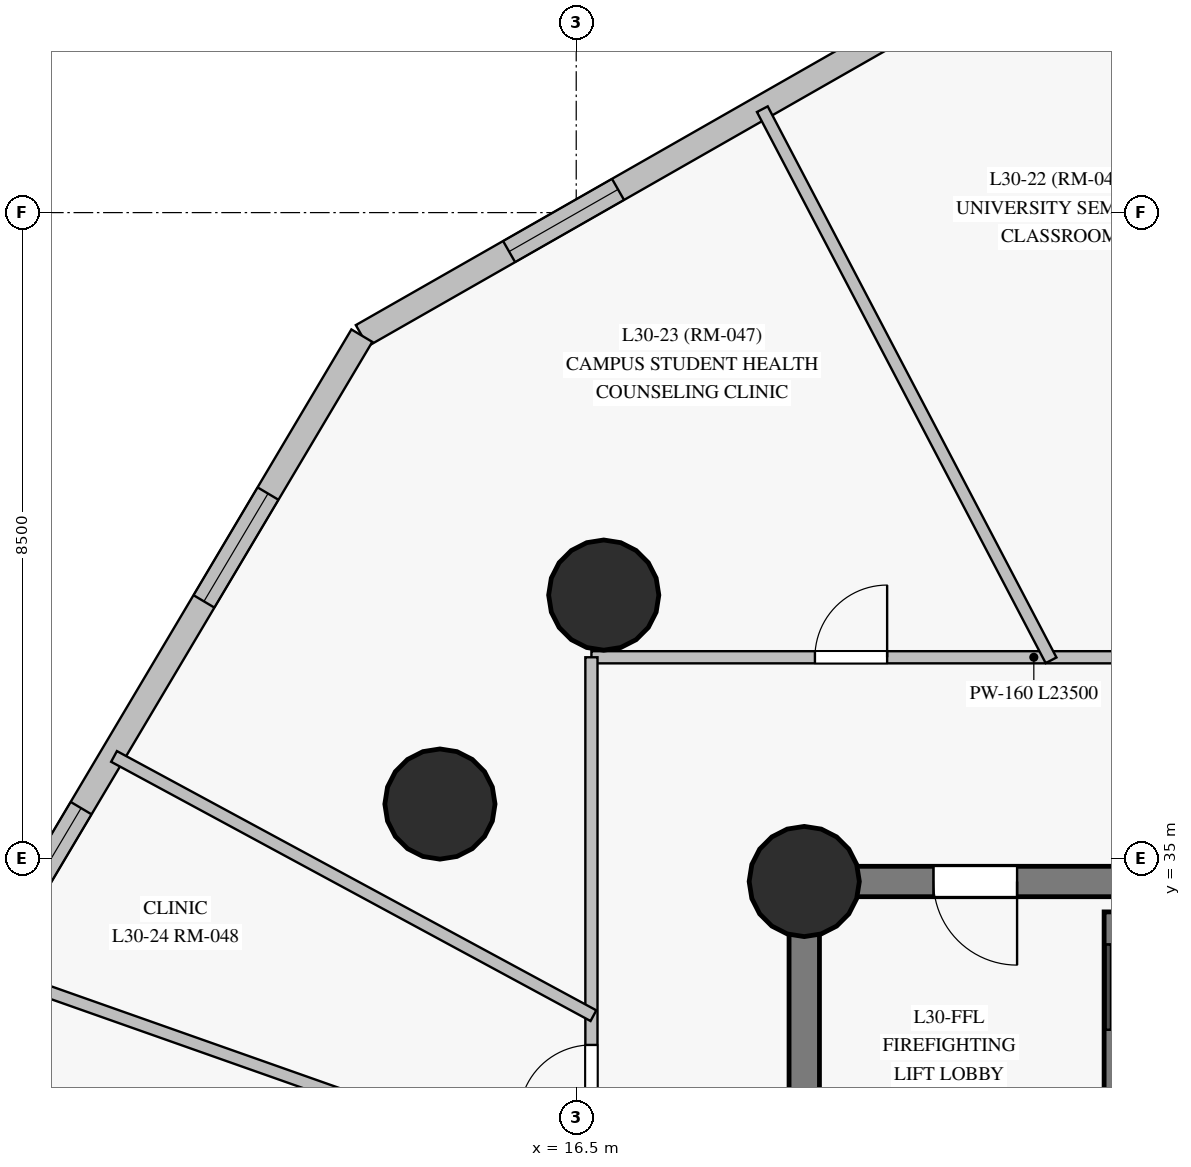
"""IFC4 building model, lengths in metres.
Left out: names, types, materials, properties, quantities, classifications, styles, units other than length and angle.
Written with IfcOpenShell. Run it as: python <this file> out.ifc"""

import sys

from ifc_helpers import new_model, si_unit, direction, frame, frame_2d, origin, origin_with_axes, origin_2d, place, context, subcontext, project, spatial, rectangle, circle, extrude, source, transform, mapped, element, fill, save


model = new_model("IFC4")
c1 = context("Model", 3, precision=1e-05, world=origin(), true_north=direction((0.0, 1.0)))
c2 = subcontext(c1, "Body", "Model", "MODEL_VIEW")
j1 = project(units=[si_unit("LENGTHUNIT", "METRE"), si_unit("PLANEANGLEUNIT", "RADIAN")], contexts=[c1])
p1 = place(None, origin())
s1 = spatial("IfcSite", under=j1, at=p1, CompositionType="ELEMENT")
p2 = place(p1, origin())
s2 = spatial("IfcBuilding", under=s1, at=p2, CompositionType="ELEMENT")
p3 = place(p2, frame((0.0, 0.0, 111.45)))
s3 = spatial("IfcBuildingStorey", under=s2, at=p3, CompositionType="ELEMENT", Elevation=111.45)
p4 = place(p3, frame((26.55, 34.7, 0.0), z_axis=(0.0, 0.0, 1.0), x_axis=(-1.0, 0.0, 0.0)))
e1 = element("IfcWall", 1, at=p4, inside=s3, PredefinedType="SHEAR", context=c2, shape_type="SweptSolid", body=[
    extrude(rectangle(XDim=7.05, YDim=0.4, at=frame_2d((3.525, 0.0))), origin(), (0.0, 0.0, 1.0), 2.825),
])
p5 = place(p4, frame((4.25, 0.0, 0.0)))
e2 = element("IfcOpeningElement", 2, at=p5, cuts=e1, PredefinedType="OPENING", context=c2, shape_type="SweptSolid", body=[
    extrude(rectangle(XDim=1.1, YDim=2.15, at=frame_2d((0.55, 1.075))), frame((0.0, 0.21, 0.0), z_axis=(0.0, -1.0, 0.0), x_axis=(1.0, 0.0, 0.0)), (0.0, 0.0, 1.0), 0.42),
])
p6 = place(p3, frame((19.5, 34.7, 0.0), z_axis=(0.0, 0.0, 1.0), x_axis=(0.0, -1.0, 0.0)))
e3 = element("IfcWall", 3, at=p6, inside=s3, PredefinedType="SHEAR", context=c2, shape_type="SweptSolid", body=[
    extrude(rectangle(XDim=16.4, YDim=0.4, at=frame_2d((8.2, 0.0))), origin(), (0.0, 0.0, 1.0), 2.825),
])
p7 = place(p6, frame((3.1, 0.0, 0.0)))
e4 = element("IfcOpeningElement", 4, at=p7, cuts=e3, PredefinedType="OPENING", context=c2, shape_type="SweptSolid", body=[
    extrude(rectangle(XDim=1.1, YDim=2.15, at=frame_2d((0.55, 1.075))), frame((0.0, 0.21, 0.0), z_axis=(0.0, -1.0, 0.0), x_axis=(1.0, 0.0, 0.0)), (0.0, 0.0, 1.0), 0.42),
])
m1 = source(origin_with_axes(), c2, "Body", "SweptSolid", [
    extrude(circle(Radius=0.725, at=origin_2d()), origin(), (0.0, 0.0, 1.0), 3.05),
])
for number, where, z_axis, x_axis in (
    (5, (19.5, 34.7, 0.0), (0.0, 0.0, 1.0), (1.0, 0.0, 0.0)),
    (6, (16.862, 38.468, 0.0), (0.0, 0.0, 1.0), (1.0, 0.0, 0.0)),
    (7, (14.707, 35.719, 0.0), (0.0, 0.0, 1.0), (1.0, 0.0, 0.0)),
):
    element("IfcColumn", number, at=place(p3, frame(where, z_axis=z_axis, x_axis=x_axis)), inside=s3, PredefinedType="COLUMN", context=c2, shape_type="MappedRepresentation", body=[
        mapped(m1, transform((0.0, 0.0, 0.0), scale=1.0)),
    ])
p8 = place(p3, frame((25.925, 48.873, 0.0), z_axis=(0.0, 0.0, 1.0), x_axis=(-0.868415696325, -0.495836846529, 0.0)))
e8 = element("IfcWall", 8, at=p8, inside=s3, PredefinedType="SOLIDWALL", context=c2, shape_type="SweptSolid", body=[
    extrude(rectangle(XDim=14.101, YDim=0.32, at=frame_2d((7.05, 0.0))), origin(), (0.0, 0.0, 1.0), 2.825),
])
p9 = place(p8, frame((3.686, 0.0, 0.85)))
e9 = element("IfcOpeningElement", 9, at=p9, cuts=e8, PredefinedType="OPENING", context=c2, shape_type="SweptSolid", body=[
    extrude(rectangle(XDim=1.65, YDim=1.65, at=frame_2d((0.825, 0.825))), frame((0.0, 0.17, 0.0), z_axis=(0.0, -1.0, 0.0), x_axis=(1.0, 0.0, 0.0)), (0.0, 0.0, 1.0), 0.34),
])
p10 = place(p8, frame((10.22, 0.0, 0.85)))
e10 = element("IfcOpeningElement", 10, at=p10, cuts=e8, PredefinedType="OPENING", context=c2, shape_type="SweptSolid", body=[
    extrude(rectangle(XDim=1.65, YDim=1.65, at=frame_2d((0.825, 0.825))), frame((0.0, 0.17, 0.0), z_axis=(0.0, -1.0, 0.0), x_axis=(1.0, 0.0, 0.0)), (0.0, 0.0, 1.0), 0.34),
])
p11 = place(p3, frame((13.68, 41.881, 0.0), z_axis=(0.0, 0.0, 1.0), x_axis=(-0.510835150925, -0.859678689151, 0.0)))
e11 = element("IfcWall", 11, at=p11, inside=s3, PredefinedType="SOLIDWALL", context=c2, shape_type="SweptSolid", body=[
    extrude(rectangle(XDim=11.303, YDim=0.32, at=frame_2d((5.652, 0.0))), origin(), (0.0, 0.0, 1.0), 2.825),
])
p12 = place(p11, frame((2.417, 0.0, 0.85)))
e12 = element("IfcOpeningElement", 12, at=p12, cuts=e11, PredefinedType="OPENING", context=c2, shape_type="SweptSolid", body=[
    extrude(rectangle(XDim=1.65, YDim=1.65, at=frame_2d((0.825, 0.825))), frame((0.0, 0.17, 0.0), z_axis=(0.0, -1.0, 0.0), x_axis=(1.0, 0.0, 0.0)), (0.0, 0.0, 1.0), 0.34),
])
p13 = place(p11, frame((7.23, 0.0, 0.85)))
e13 = element("IfcOpeningElement", 13, at=p13, cuts=e11, PredefinedType="OPENING", context=c2, shape_type="SweptSolid", body=[
    extrude(rectangle(XDim=1.65, YDim=1.65, at=frame_2d((0.825, 0.825))), frame((0.0, 0.17, 0.0), z_axis=(0.0, -1.0, 0.0), x_axis=(1.0, 0.0, 0.0)), (0.0, 0.0, 1.0), 0.34),
])
p14 = place(p3, frame((23.545, 18.7, 0.0), z_axis=(0.0, 0.0, 1.0), x_axis=(0.0, 1.0, 0.0)))
e14 = element("IfcWall", 14, at=p14, inside=s3, PredefinedType="SHEAR", context=c2, shape_type="SweptSolid", body=[
    extrude(rectangle(XDim=15.6, YDim=0.2, at=frame_2d((7.8, 0.0))), origin(), (0.0, 0.0, 1.0), 2.825),
])
p15 = place(p14, frame((2.75, 0.0, 0.0)))
e15 = element("IfcOpeningElement", 15, at=p15, cuts=e14, PredefinedType="OPENING", context=c2, shape_type="SweptSolid", body=[
    extrude(rectangle(XDim=1.15, YDim=2.15, at=frame_2d((0.575, 1.075))), frame((0.0, 0.11, 0.0), z_axis=(0.0, -1.0, 0.0), x_axis=(1.0, 0.0, 0.0)), (0.0, 0.0, 1.0), 0.22),
])
p16 = place(p14, frame((0.14, 0.0, 0.0)))
e16 = element("IfcOpeningElement", 16, at=p16, cuts=e14, PredefinedType="OPENING", context=c2, shape_type="SweptSolid", body=[
    extrude(rectangle(XDim=0.88, YDim=2.1, at=frame_2d((0.44, 1.05))), frame((0.0, 0.11, 0.0), z_axis=(0.0, -1.0, 0.0), x_axis=(1.0, 0.0, 0.0)), (0.0, 0.0, 1.0), 0.22),
])
p17 = place(p14, frame((1.36, 0.0, 0.0)))
e17 = element("IfcOpeningElement", 17, at=p17, cuts=e14, PredefinedType="OPENING", context=c2, shape_type="SweptSolid", body=[
    extrude(rectangle(XDim=0.88, YDim=2.1, at=frame_2d((0.44, 1.05))), frame((0.0, 0.11, 0.0), z_axis=(0.0, -1.0, 0.0), x_axis=(1.0, 0.0, 0.0)), (0.0, 0.0, 1.0), 0.22),
])
p18 = place(p14, frame((12.1, 0.0, 0.0)))
e18 = element("IfcOpeningElement", 18, at=p18, cuts=e14, PredefinedType="OPENING", context=c2, shape_type="SweptSolid", body=[
    extrude(rectangle(XDim=1.12, YDim=2.15, at=frame_2d((0.56, 1.075))), frame((0.0, 0.11, 0.0), z_axis=(0.0, -1.0, 0.0), x_axis=(1.0, 0.0, 0.0)), (0.0, 0.0, 1.0), 0.22),
])
p19 = place(p14, frame((14.05, 0.0, 0.0)))
e19 = element("IfcOpeningElement", 19, at=p19, cuts=e14, PredefinedType="OPENING", context=c2, shape_type="SweptSolid", body=[
    extrude(rectangle(XDim=1.12, YDim=2.15, at=frame_2d((0.56, 1.075))), frame((0.0, 0.11, 0.0), z_axis=(0.0, -1.0, 0.0), x_axis=(1.0, 0.0, 0.0)), (0.0, 0.0, 1.0), 0.22),
])
p20 = place(p3, frame((16.7, 37.65, 0.0), z_axis=(0.0, 0.0, 1.0), x_axis=(1.0, 0.0, 0.0)))
e20 = element("IfcWall", 20, at=p20, inside=s3, PredefinedType="PARTITIONING", context=c2, shape_type="SweptSolid", body=[
    extrude(rectangle(XDim=23.5, YDim=0.16, at=frame_2d((11.75, 0.0))), origin(), (0.0, 0.0, 1.0), 2.325),
])
p21 = place(p20, frame((20.456, 0.0, 0.0)))
e21 = element("IfcOpeningElement", 21, at=p21, cuts=e20, PredefinedType="OPENING", context=c2, shape_type="SweptSolid", body=[
    extrude(rectangle(XDim=0.96, YDim=2.15, at=frame_2d((0.48, 1.075))), frame((0.0, 0.09, 0.0), z_axis=(0.0, -1.0, 0.0), x_axis=(1.0, 0.0, 0.0)), (0.0, 0.0, 1.0), 0.18),
])
p22 = place(p20, frame((19.359, 0.0, 0.0)))
e22 = element("IfcOpeningElement", 22, at=p22, cuts=e20, PredefinedType="OPENING", context=c2, shape_type="SweptSolid", body=[
    extrude(rectangle(XDim=0.95, YDim=2.15, at=frame_2d((0.475, 1.075))), frame((0.0, 0.09, 0.0), z_axis=(0.0, -1.0, 0.0), x_axis=(1.0, 0.0, 0.0)), (0.0, 0.0, 1.0), 0.18),
])
p23 = place(p20, frame((15.91, 0.0, 0.0)))
e23 = element("IfcOpeningElement", 23, at=p23, cuts=e20, PredefinedType="OPENING", context=c2, shape_type="SweptSolid", body=[
    extrude(rectangle(XDim=0.95, YDim=2.15, at=frame_2d((0.475, 1.075))), frame((0.0, 0.09, 0.0), z_axis=(0.0, -1.0, 0.0), x_axis=(1.0, 0.0, 0.0)), (0.0, 0.0, 1.0), 0.18),
])
p24 = place(p20, frame((14.8, 0.0, 0.0)))
e24 = element("IfcOpeningElement", 24, at=p24, cuts=e20, PredefinedType="OPENING", context=c2, shape_type="SweptSolid", body=[
    extrude(rectangle(XDim=0.96, YDim=2.15, at=frame_2d((0.48, 1.075))), frame((0.0, 0.09, 0.0), z_axis=(0.0, -1.0, 0.0), x_axis=(1.0, 0.0, 0.0)), (0.0, 0.0, 1.0), 0.18),
])
p25 = place(p20, frame((11.365, 0.0, 0.0)))
e25 = element("IfcOpeningElement", 25, at=p25, cuts=e20, PredefinedType="OPENING", context=c2, shape_type="SweptSolid", body=[
    extrude(rectangle(XDim=0.95, YDim=2.15, at=frame_2d((0.475, 1.075))), frame((0.0, 0.09, 0.0), z_axis=(0.0, -1.0, 0.0), x_axis=(1.0, 0.0, 0.0)), (0.0, 0.0, 1.0), 0.18),
])
p26 = place(p20, frame((7.75, 0.0, 0.0)))
e26 = element("IfcOpeningElement", 26, at=p26, cuts=e20, PredefinedType="OPENING", context=c2, shape_type="SweptSolid", body=[
    extrude(rectangle(XDim=0.96, YDim=2.15, at=frame_2d((0.48, 1.075))), frame((0.0, 0.09, 0.0), z_axis=(0.0, -1.0, 0.0), x_axis=(1.0, 0.0, 0.0)), (0.0, 0.0, 1.0), 0.18),
])
p27 = place(p20, frame((2.94, 0.0, 0.0)))
e27 = element("IfcOpeningElement", 27, at=p27, cuts=e20, PredefinedType="OPENING", context=c2, shape_type="SweptSolid", body=[
    extrude(rectangle(XDim=0.95, YDim=2.15, at=frame_2d((0.475, 1.075))), frame((0.0, 0.09, 0.0), z_axis=(0.0, -1.0, 0.0), x_axis=(1.0, 0.0, 0.0)), (0.0, 0.0, 1.0), 0.18),
])
p28 = place(p20, frame((17.561, 0.0, 0.0)))
e28 = element("IfcOpeningElement", 28, at=p28, cuts=e20, PredefinedType="OPENING", context=c2, shape_type="SweptSolid", body=[
    extrude(rectangle(XDim=0.86, YDim=2.04, at=frame_2d((0.43, 1.02))), frame((0.0, 0.09, 0.0), z_axis=(0.0, -1.0, 0.0), x_axis=(1.0, 0.0, 0.0)), (0.0, 0.0, 1.0), 0.18),
])
p29 = place(p3, frame((16.7, 15.35, 0.0), z_axis=(0.0, 0.0, 1.0), x_axis=(0.0, 1.0, 0.0)))
e29 = element("IfcWall", 29, at=p29, inside=s3, PredefinedType="PARTITIONING", context=c2, shape_type="SweptSolid", body=[
    extrude(rectangle(XDim=22.3, YDim=0.16, at=frame_2d((11.15, 0.0))), origin(), (0.0, 0.0, 1.0), 2.225),
])
p30 = place(p29, frame((10.635, 0.0, 0.0)))
e30 = element("IfcOpeningElement", 30, at=p30, cuts=e29, PredefinedType="OPENING", context=c2, shape_type="SweptSolid", body=[
    extrude(rectangle(XDim=0.95, YDim=2.15, at=frame_2d((0.475, 1.075))), frame((0.0, 0.09, 0.0), z_axis=(0.0, -1.0, 0.0), x_axis=(1.0, 0.0, 0.0)), (0.0, 0.0, 1.0), 0.18),
])
p31 = place(p29, frame((5.64, 0.0, 0.0)))
e31 = element("IfcOpeningElement", 31, at=p31, cuts=e29, PredefinedType="OPENING", context=c2, shape_type="SweptSolid", body=[
    extrude(rectangle(XDim=0.96, YDim=2.15, at=frame_2d((0.48, 1.075))), frame((0.0, 0.09, 0.0), z_axis=(0.0, -1.0, 0.0), x_axis=(1.0, 0.0, 0.0)), (0.0, 0.0, 1.0), 0.18),
])
p32 = place(p29, frame((3.071, 0.0, 0.0)))
e32 = element("IfcOpeningElement", 32, at=p32, cuts=e29, PredefinedType="OPENING", context=c2, shape_type="SweptSolid", body=[
    extrude(rectangle(XDim=0.95, YDim=2.15, at=frame_2d((0.475, 1.075))), frame((0.0, 0.09, 0.0), z_axis=(0.0, -1.0, 0.0), x_axis=(1.0, 0.0, 0.0)), (0.0, 0.0, 1.0), 0.18),
])
p33 = place(p29, frame((16.25, 0.0, 0.0)))
e33 = element("IfcOpeningElement", 33, at=p33, cuts=e29, PredefinedType="OPENING", context=c2, shape_type="SweptSolid", body=[
    extrude(rectangle(XDim=0.95, YDim=2.15, at=frame_2d((0.475, 1.075))), frame((0.0, 0.09, 0.0), z_axis=(0.0, -1.0, 0.0), x_axis=(1.0, 0.0, 0.0)), (0.0, 0.0, 1.0), 0.18),
])
p34 = place(p29, frame((14.02, 0.0, 0.0)))
e34 = element("IfcOpeningElement", 34, at=p34, cuts=e29, PredefinedType="OPENING", context=c2, shape_type="SweptSolid", body=[
    extrude(rectangle(XDim=0.96, YDim=2.15, at=frame_2d((0.48, 1.075))), frame((0.0, 0.09, 0.0), z_axis=(0.0, -1.0, 0.0), x_axis=(1.0, 0.0, 0.0)), (0.0, 0.0, 1.0), 0.18),
])
p35 = place(p3, frame((16.742, 30.713, 0.0), z_axis=(0.0, 0.0, 1.0), x_axis=(-0.942995651182, 0.33280505082, 0.0)))
e35 = element("IfcWall", 35, at=p35, inside=s3, PredefinedType="PARTITIONING", context=c2, shape_type="SweptSolid", body=[
    extrude(rectangle(XDim=8.476, YDim=0.16, at=frame_2d((4.238, 0.0))), origin(), (0.0, 0.0, 1.0), 2.825),
])
p36 = place(p3, frame((22.747, 37.61, 0.0), z_axis=(0.0, 0.0, 1.0), x_axis=(-0.464074979272, 0.885795920974, 0.0)))
e36 = element("IfcWall", 36, at=p36, inside=s3, PredefinedType="PARTITIONING", context=c2, shape_type="SweptSolid", body=[
    extrude(rectangle(XDim=8.185, YDim=0.16, at=frame_2d((4.093, 0.0))), origin(), (0.0, 0.0, 1.0), 2.825),
])
p37 = place(p3, frame((16.726, 32.935, 0.0), z_axis=(0.0, 0.0, 1.0), x_axis=(-0.879632203362, 0.475654482591, 0.0)))
e37 = element("IfcWall", 37, at=p37, inside=s3, PredefinedType="PARTITIONING", context=c2, shape_type="SweptSolid", body=[
    extrude(rectangle(XDim=7.17, YDim=0.16, at=frame_2d((3.585, 0.0))), origin(), (0.0, 0.0, 1.0), 2.825),
])
m2 = source(origin_with_axes(), c2, "Body", "SweptSolid", [
    extrude(rectangle(XDim=1.65, YDim=1.65, at=frame_2d((0.825, 0.825))), frame((0.0, 0.03, 0.0), z_axis=(0.0, -1.0, 0.0), x_axis=(1.0, 0.0, 0.0)), (0.0, 0.0, 1.0), 0.06),
])
p38 = place(p10, origin())
e38 = element("IfcWindow", 38, at=p38, inside=s3, PartitioningType="SINGLE_PANEL", PredefinedType="WINDOW", context=c2, shape_type="MappedRepresentation", body=[
    mapped(m2, transform((0.0, 0.0, 0.0), scale=1.0)),
])
fill(e10, e38)
p39 = place(p12, origin())
e39 = element("IfcWindow", 39, at=p39, inside=s3, PartitioningType="SINGLE_PANEL", PredefinedType="WINDOW", context=c2, shape_type="MappedRepresentation", body=[
    mapped(m2, transform((0.0, 0.0, 0.0), scale=1.0)),
])
fill(e12, e39)
p40 = place(p13, origin())
e40 = element("IfcWindow", 40, at=p40, inside=s3, PartitioningType="SINGLE_PANEL", PredefinedType="WINDOW", context=c2, shape_type="MappedRepresentation", body=[
    mapped(m2, transform((0.0, 0.0, 0.0), scale=1.0)),
])
fill(e13, e40)
m3 = source(origin_with_axes(), c2, "Body", "SweptSolid", [
    extrude(rectangle(XDim=1.1, YDim=2.15, at=frame_2d((0.55, 1.075))), frame((0.0, 0.025, 0.0), z_axis=(0.0, -1.0, 0.0), x_axis=(1.0, 0.0, 0.0)), (0.0, 0.0, 1.0), 0.05),
])
p41 = place(p5, origin())
e41 = element("IfcDoor", 41, at=p41, inside=s3, OperationType="SINGLE_SWING_LEFT", PredefinedType="DOOR", context=c2, shape_type="MappedRepresentation", body=[
    mapped(m3, transform((0.0, 0.0, 0.0), scale=1.0)),
])
fill(e2, e41)
m4 = source(origin_with_axes(), c2, "Body", "SweptSolid", [
    extrude(rectangle(XDim=1.12, YDim=2.15, at=frame_2d((0.56, 1.075))), frame((0.0, 0.025, 0.0), z_axis=(0.0, -1.0, 0.0), x_axis=(1.0, 0.0, 0.0)), (0.0, 0.0, 1.0), 0.05),
])
p42 = place(p19, origin())
e42 = element("IfcDoor", 42, at=p42, inside=s3, OperationType="SLIDING_TO_RIGHT", PredefinedType="DOOR", context=c2, shape_type="MappedRepresentation", body=[
    mapped(m4, transform((0.0, 0.0, 0.0), scale=1.0)),
])
fill(e19, e42)
m5 = source(origin_with_axes(), c2, "Body", "SweptSolid", [
    extrude(rectangle(XDim=0.95, YDim=2.15, at=frame_2d((0.475, 1.075))), frame((0.0, 0.025, 0.0), z_axis=(0.0, -1.0, 0.0), x_axis=(1.0, 0.0, 0.0)), (0.0, 0.0, 1.0), 0.05),
])
p43 = place(p27, origin())
e43 = element("IfcDoor", 43, at=p43, inside=s3, OperationType="SINGLE_SWING_RIGHT", PredefinedType="DOOR", context=c2, shape_type="MappedRepresentation", body=[
    mapped(m5, transform((0.0, 0.0, 0.0), scale=1.0)),
])
fill(e27, e43)
p44 = place(p33, origin())
e44 = element("IfcDoor", 44, at=p44, inside=s3, OperationType="SINGLE_SWING_LEFT", PredefinedType="DOOR", context=c2, shape_type="MappedRepresentation", body=[
    mapped(m5, transform((0.0, 0.0, 0.0), scale=1.0)),
])
fill(e33, e44)
save(model, sys.argv[1])
